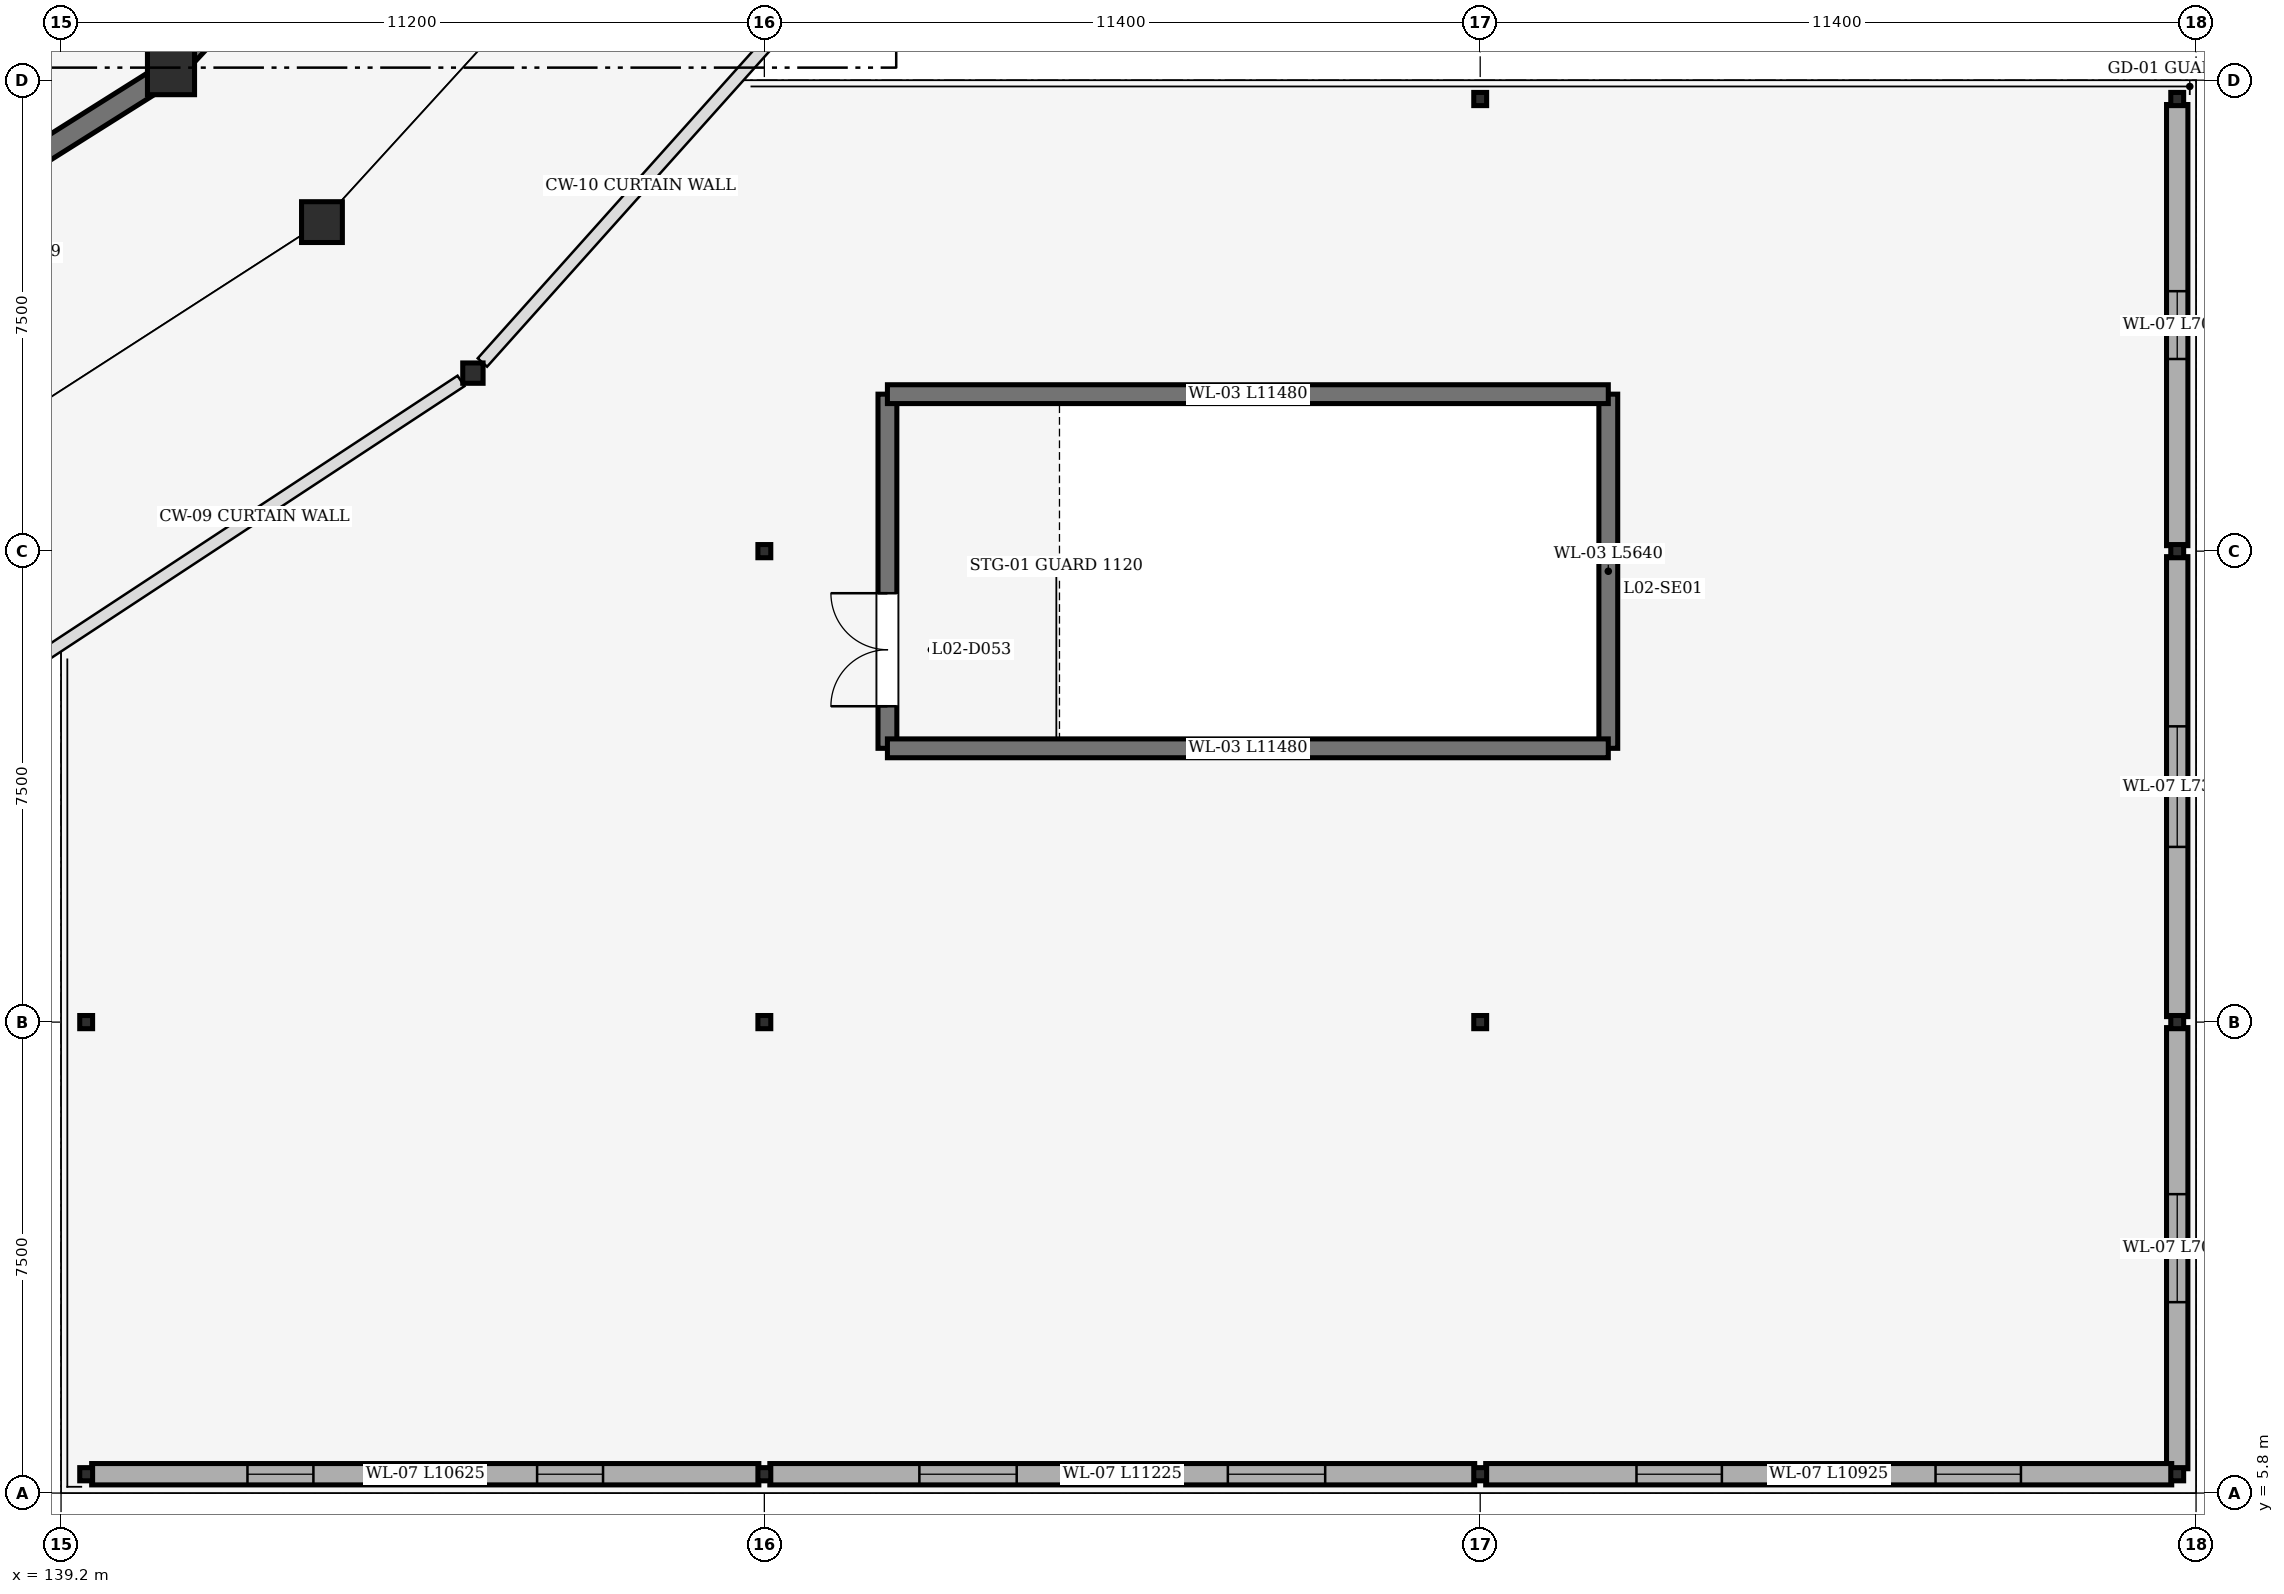
"""IFC4 building model, lengths in metres.
Left out: names, types, materials, properties, quantities, classifications, styles, units other than length and angle.
Written with IfcOpenShell. Run it as: python <this file> out.ifc"""

import sys

from ifc_helpers import new_model, si_unit, direction, frame, frame_2d, origin, origin_2d, place, context, subcontext, project, spatial, rectangle, circle, hollow_circle, i_section, extrude, element, fill, save


model = new_model("IFC4")
c1 = context("Model", 3, precision=1e-05, world=origin(), true_north=direction((0.0, 1.0)))
c2 = subcontext(c1, "Body", "Model", "MODEL_VIEW")
j1 = project(units=[si_unit("LENGTHUNIT", "METRE"), si_unit("PLANEANGLEUNIT", "RADIAN")], contexts=[c1])
p1 = place(None, origin())
s1 = spatial("IfcSite", under=j1, at=p1, CompositionType="ELEMENT")
p2 = place(p1, origin())
s2 = spatial("IfcBuilding", under=s1, at=p2, CompositionType="ELEMENT")
p3 = place(p2, frame((0.0, 0.0, 5.4)))
s3 = spatial("IfcBuildingStorey", under=s2, at=p3, CompositionType="ELEMENT", Elevation=5.4)
p4 = place(p3, frame((140.951, 28.444, 0.0), z_axis=(0.0, 0.0, 1.0), x_axis=(1.0, 0.0, 0.0)))
e1 = element("IfcColumn", 1, at=p4, inside=s3, PredefinedType="COLUMN", context=c2, shape_type="SweptSolid", body=[
    extrude(circle(Radius=0.375, at=origin_2d()), origin(), (0.0, 0.0, 1.0), 4.8),
])
p5 = place(p3, frame((143.355, 26.04, 0.0), z_axis=(0.0, 0.0, 1.0), x_axis=(1.0, 0.0, 0.0)))
e2 = element("IfcColumn", 2, at=p5, inside=s3, PredefinedType="COLUMN", context=c2, shape_type="SweptSolid", body=[
    extrude(circle(Radius=0.325, at=origin_2d()), origin(), (0.0, 0.0, 1.0), 4.8),
])
p6 = place(p3, frame((145.759, 23.635, 0.0), z_axis=(0.0, 0.0, 1.0), x_axis=(1.0, 0.0, 0.0)))
e3 = element("IfcColumn", 3, at=p6, inside=s3, PredefinedType="COLUMN", context=c2, shape_type="SweptSolid", body=[
    extrude(hollow_circle(Radius=0.162, WallThickness=0.013, at=origin_2d()), origin(), (0.0, 0.0, 1.0), 4.8),
])
for number, where, z_axis, x_axis in (
    (4, (139.6, 6.1, 0.0), (0.0, 0.0, 1.0), (1.0, 0.0, 0.0)),
    (5, (139.6, 13.3, 0.0), (0.0, 0.0, 1.0), (1.0, 0.0, 0.0)),
    (6, (150.4, 6.1, 0.0), (0.0, 0.0, 1.0), (1.0, 0.0, 0.0)),
    (7, (150.4, 13.3, 0.0), (0.0, 0.0, 1.0), (1.0, 0.0, 0.0)),
    (8, (150.4, 20.8, 0.0), (0.0, 0.0, 1.0), (1.0, 0.0, 0.0)),
    (9, (161.8, 6.1, 0.0), (0.0, 0.0, 1.0), (1.0, 0.0, 0.0)),
    (10, (161.8, 13.3, 0.0), (0.0, 0.0, 1.0), (1.0, 0.0, 0.0)),
    (11, (161.8, 28.0, 0.0), (0.0, 0.0, 1.0), (1.0, 0.0, 0.0)),
    (12, (172.9, 6.1, 0.0), (0.0, 0.0, 1.0), (1.0, 0.0, 0.0)),
    (13, (172.9, 13.3, 0.0), (0.0, 0.0, 1.0), (1.0, 0.0, 0.0)),
    (14, (172.9, 20.8, 0.0), (0.0, 0.0, 1.0), (1.0, 0.0, 0.0)),
    (15, (172.9, 28.0, 0.0), (0.0, 0.0, 1.0), (1.0, 0.0, 0.0)),
):
    element("IfcColumn", number, at=place(p3, frame(where, z_axis=z_axis, x_axis=x_axis)), inside=s3, PredefinedType="COLUMN", context=c2, shape_type="SweptSolid", body=[
        extrude(i_section(OverallWidth=0.205, OverallDepth=0.21, WebThickness=0.009, FlangeThickness=0.014, at=origin_2d()), origin(), (0.0, 0.0, 1.0), 4.8),
    ])
p7 = place(p3, frame((135.662, 25.113, 0.0), z_axis=(0.0, 0.0, 1.0), x_axis=(0.846113390603, 0.53300293643, 0.0)))
e16 = element("IfcWall", 16, at=p7, inside=s3, PredefinedType="SHEAR", context=c2, shape_type="SweptSolid", body=[
    extrude(rectangle(XDim=5.94, YDim=0.35, at=frame_2d((2.97, 0.0))), origin(), (0.0, 0.0, 1.0), 4.52),
])
p8 = place(p7, frame((2.41, 0.0, 0.0)))
e17 = element("IfcOpeningElement", 17, at=p8, cuts=e16, PredefinedType="OPENING", context=c2, shape_type="SweptSolid", body=[
    extrude(rectangle(XDim=1.12, YDim=2.26, at=frame_2d((0.56, 1.13))), frame((0.0, 0.187, 0.0), z_axis=(0.0, -1.0, 0.0), x_axis=(1.0, 0.0, 0.0)), (0.0, 0.0, 1.0), 0.374),
])
p9 = place(p3, frame((141.162, 28.67, 0.0), z_axis=(0.0, 0.0, 1.0), x_axis=(0.682886399388, 0.730524582427, 0.0)))
e18 = element("IfcWall", 18, at=p9, inside=s3, PredefinedType="SHEAR", context=c2, shape_type="SweptSolid", body=[
    extrude(rectangle(XDim=5.617, YDim=0.35, at=frame_2d((2.809, 0.0))), origin(), (0.0, 0.0, 1.0), 4.52),
])
p10 = place(p9, frame((2.248, 0.0, 0.0)))
e19 = element("IfcOpeningElement", 19, at=p10, cuts=e18, PredefinedType="OPENING", context=c2, shape_type="SweptSolid", body=[
    extrude(rectangle(XDim=1.12, YDim=2.26, at=frame_2d((0.56, 1.13))), frame((0.0, 0.187, 0.0), z_axis=(0.0, -1.0, 0.0), x_axis=(1.0, 0.0, 0.0)), (0.0, 0.0, 1.0), 0.374),
])
p11 = place(p3, frame((172.9, 13.212, 0.0), z_axis=(0.0, 0.0, 1.0), x_axis=(0.0, -1.0, 0.0)))
e20 = element("IfcWall", 20, at=p11, inside=s3, PredefinedType="STANDARD", context=c2, shape_type="SweptSolid", body=[
    extrude(rectangle(XDim=7.025, YDim=0.34, at=frame_2d((3.512, 0.0))), origin(), (0.0, 0.0, 1.0), 3.835),
])
p12 = place(p11, frame((2.653, 0.0, 0.85)))
e21 = element("IfcOpeningElement", 21, at=p12, cuts=e20, PredefinedType="OPENING", context=c2, shape_type="SweptSolid", body=[
    extrude(rectangle(XDim=1.72, YDim=1.75, at=frame_2d((0.86, 0.875))), frame((0.0, 0.182, 0.0), z_axis=(0.0, -1.0, 0.0), x_axis=(1.0, 0.0, 0.0)), (0.0, 0.0, 1.0), 0.364),
])
p13 = place(p3, frame((172.9, 20.712, 0.0), z_axis=(0.0, 0.0, 1.0), x_axis=(0.0, -1.0, 0.0)))
e22 = element("IfcWall", 22, at=p13, inside=s3, PredefinedType="STANDARD", context=c2, shape_type="SweptSolid", body=[
    extrude(rectangle(XDim=7.325, YDim=0.34, at=frame_2d((3.663, 0.0))), origin(), (0.0, 0.0, 1.0), 3.835),
])
p14 = place(p13, frame((2.702, 0.0, 0.85)))
e23 = element("IfcOpeningElement", 23, at=p14, cuts=e22, PredefinedType="OPENING", context=c2, shape_type="SweptSolid", body=[
    extrude(rectangle(XDim=1.92, YDim=1.75, at=frame_2d((0.96, 0.875))), frame((0.0, 0.182, 0.0), z_axis=(0.0, -1.0, 0.0), x_axis=(1.0, 0.0, 0.0)), (0.0, 0.0, 1.0), 0.364),
])
p15 = place(p3, frame((172.9, 27.913, 0.0), z_axis=(0.0, 0.0, 1.0), x_axis=(0.0, -1.0, 0.0)))
e24 = element("IfcWall", 24, at=p15, inside=s3, PredefinedType="STANDARD", context=c2, shape_type="SweptSolid", body=[
    extrude(rectangle(XDim=7.025, YDim=0.34, at=frame_2d((3.513, 0.0))), origin(), (0.0, 0.0, 1.0), 3.909),
])
p16 = place(p15, frame((2.972, 0.0, 0.85)))
e25 = element("IfcOpeningElement", 25, at=p16, cuts=e24, PredefinedType="OPENING", context=c2, shape_type="SweptSolid", body=[
    extrude(rectangle(XDim=1.08, YDim=1.5, at=frame_2d((0.54, 0.75))), frame((0.0, 0.182, 0.0), z_axis=(0.0, -1.0, 0.0), x_axis=(1.0, 0.0, 0.0)), (0.0, 0.0, 1.0), 0.364),
])
p17 = place(p3, frame((172.812, 6.1, 0.0), z_axis=(0.0, 0.0, 1.0), x_axis=(-1.0, 0.0, 0.0)))
e26 = element("IfcWall", 26, at=p17, inside=s3, PredefinedType="STANDARD", context=c2, shape_type="SweptSolid", body=[
    extrude(rectangle(XDim=10.925, YDim=0.34, at=frame_2d((5.462, 0.0))), origin(), (0.0, 0.0, 1.0), 3.737),
])
p18 = place(p17, frame((2.401, 0.0, 0.85)))
e27 = element("IfcOpeningElement", 27, at=p18, cuts=e26, PredefinedType="OPENING", context=c2, shape_type="SweptSolid", body=[
    extrude(rectangle(XDim=1.36, YDim=1.5, at=frame_2d((0.68, 0.75))), frame((0.0, 0.182, 0.0), z_axis=(0.0, -1.0, 0.0), x_axis=(1.0, 0.0, 0.0)), (0.0, 0.0, 1.0), 0.364),
])
p19 = place(p17, frame((7.164, 0.0, 0.85)))
e28 = element("IfcOpeningElement", 28, at=p19, cuts=e26, PredefinedType="OPENING", context=c2, shape_type="SweptSolid", body=[
    extrude(rectangle(XDim=1.36, YDim=1.5, at=frame_2d((0.68, 0.75))), frame((0.0, 0.182, 0.0), z_axis=(0.0, -1.0, 0.0), x_axis=(1.0, 0.0, 0.0)), (0.0, 0.0, 1.0), 0.364),
])
p20 = place(p3, frame((161.712, 6.1, 0.0), z_axis=(0.0, 0.0, 1.0), x_axis=(-1.0, 0.0, 0.0)))
e29 = element("IfcWall", 29, at=p20, inside=s3, PredefinedType="STANDARD", context=c2, shape_type="SweptSolid", body=[
    extrude(rectangle(XDim=11.225, YDim=0.34, at=frame_2d((5.612, 0.0))), origin(), (0.0, 0.0, 1.0), 3.737),
])
p21 = place(p20, frame((2.381, 0.0, 0.85)))
e30 = element("IfcOpeningElement", 30, at=p21, cuts=e29, PredefinedType="OPENING", context=c2, shape_type="SweptSolid", body=[
    extrude(rectangle(XDim=1.55, YDim=1.5, at=frame_2d((0.775, 0.75))), frame((0.0, 0.182, 0.0), z_axis=(0.0, -1.0, 0.0), x_axis=(1.0, 0.0, 0.0)), (0.0, 0.0, 1.0), 0.364),
])
p22 = place(p20, frame((7.294, 0.0, 0.85)))
e31 = element("IfcOpeningElement", 31, at=p22, cuts=e29, PredefinedType="OPENING", context=c2, shape_type="SweptSolid", body=[
    extrude(rectangle(XDim=1.55, YDim=1.5, at=frame_2d((0.775, 0.75))), frame((0.0, 0.182, 0.0), z_axis=(0.0, -1.0, 0.0), x_axis=(1.0, 0.0, 0.0)), (0.0, 0.0, 1.0), 0.364),
])
p23 = place(p3, frame((150.312, 6.1, 0.0), z_axis=(0.0, 0.0, 1.0), x_axis=(-1.0, 0.0, 0.0)))
e32 = element("IfcWall", 32, at=p23, inside=s3, PredefinedType="STANDARD", context=c2, shape_type="SweptSolid", body=[
    extrude(rectangle(XDim=10.625, YDim=0.34, at=frame_2d((5.312, 0.0))), origin(), (0.0, 0.0, 1.0), 3.737),
])
p24 = place(p23, frame((2.481, 0.0, 0.85)))
e33 = element("IfcOpeningElement", 33, at=p24, cuts=e32, PredefinedType="OPENING", context=c2, shape_type="SweptSolid", body=[
    extrude(rectangle(XDim=1.05, YDim=2.2, at=frame_2d((0.525, 1.1))), frame((0.0, 0.182, 0.0), z_axis=(0.0, -1.0, 0.0), x_axis=(1.0, 0.0, 0.0)), (0.0, 0.0, 1.0), 0.364),
])
p25 = place(p23, frame((7.094, 0.0, 0.85)))
e34 = element("IfcOpeningElement", 34, at=p25, cuts=e32, PredefinedType="OPENING", context=c2, shape_type="SweptSolid", body=[
    extrude(rectangle(XDim=1.05, YDim=2.2, at=frame_2d((0.525, 1.1))), frame((0.0, 0.182, 0.0), z_axis=(0.0, -1.0, 0.0), x_axis=(1.0, 0.0, 0.0)), (0.0, 0.0, 1.0), 0.364),
])
p26 = place(p3, frame((152.36, 17.66, 0.0), z_axis=(0.0, 0.0, 1.0), x_axis=(0.0, 1.0, 0.0)))
e35 = element("IfcWall", 35, at=p26, inside=s3, PredefinedType="SHEAR", context=c2, shape_type="SweptSolid", body=[
    extrude(rectangle(XDim=5.64, YDim=0.3, at=frame_2d((2.82, 0.0))), origin(), (0.0, 0.0, 1.0), 4.45),
])
p27 = place(p26, frame((0.67, 0.0, 0.0)))
e36 = element("IfcOpeningElement", 36, at=p27, cuts=e35, PredefinedType="OPENING", context=c2, shape_type="SweptSolid", body=[
    extrude(rectangle(XDim=1.8, YDim=2.2, at=frame_2d((0.9, 1.1))), frame((0.0, 0.162, 0.0), z_axis=(0.0, -1.0, 0.0), x_axis=(1.0, 0.0, 0.0)), (0.0, 0.0, 1.0), 0.324),
])
p28 = place(p3, frame((163.84, 23.3, 0.0), z_axis=(0.0, 0.0, 1.0), x_axis=(0.0, -1.0, 0.0)))
e37 = element("IfcWall", 37, at=p28, inside=s3, PredefinedType="SHEAR", context=c2, shape_type="SweptSolid", body=[
    extrude(rectangle(XDim=5.64, YDim=0.3, at=frame_2d((2.82, 0.0))), origin(), (0.0, 0.0, 1.0), 4.45),
])
for number, where, z_axis, x_axis in (
    (38, (163.84, 17.66, 0.0), (0.0, 0.0, 1.0), (-1.0, 0.0, 0.0)),
    (39, (152.36, 23.3, 0.0), (0.0, 0.0, 1.0), (1.0, 0.0, 0.0)),
):
    element("IfcWall", number, at=place(p3, frame(where, z_axis=z_axis, x_axis=x_axis)), inside=s3, PredefinedType="SHEAR", context=c2, shape_type="SweptSolid", body=[
        extrude(rectangle(XDim=11.48, YDim=0.3, at=frame_2d((5.74, 0.0))), origin(), (0.0, 0.0, 1.0), 4.45),
    ])
p29 = place(p12, origin())
e40 = element("IfcWindow", 40, at=p29, inside=s3, PartitioningType="DOUBLE_PANEL_VERTICAL", PredefinedType="WINDOW", context=c2, shape_type="SweptSolid", body=[
    extrude(rectangle(XDim=1.72, YDim=1.75, at=frame_2d((0.86, 0.875))), frame((0.0, 0.03, 0.0), z_axis=(0.0, -1.0, 0.0), x_axis=(1.0, 0.0, 0.0)), (0.0, 0.0, 1.0), 0.06),
])
fill(e21, e40)
p30 = place(p14, origin())
e41 = element("IfcWindow", 41, at=p30, inside=s3, PartitioningType="DOUBLE_PANEL_VERTICAL", PredefinedType="WINDOW", context=c2, shape_type="SweptSolid", body=[
    extrude(rectangle(XDim=1.92, YDim=1.75, at=frame_2d((0.96, 0.875))), frame((0.0, 0.03, 0.0), z_axis=(0.0, -1.0, 0.0), x_axis=(1.0, 0.0, 0.0)), (0.0, 0.0, 1.0), 0.06),
])
fill(e23, e41)
p31 = place(p16, origin())
e42 = element("IfcWindow", 42, at=p31, inside=s3, PartitioningType="DOUBLE_PANEL_VERTICAL", PredefinedType="WINDOW", context=c2, shape_type="SweptSolid", body=[
    extrude(rectangle(XDim=1.08, YDim=1.5, at=frame_2d((0.54, 0.75))), frame((0.0, 0.03, 0.0), z_axis=(0.0, -1.0, 0.0), x_axis=(1.0, 0.0, 0.0)), (0.0, 0.0, 1.0), 0.06),
])
fill(e25, e42)
p32 = place(p18, origin())
e43 = element("IfcWindow", 43, at=p32, inside=s3, PartitioningType="DOUBLE_PANEL_VERTICAL", PredefinedType="WINDOW", context=c2, shape_type="SweptSolid", body=[
    extrude(rectangle(XDim=1.36, YDim=1.5, at=frame_2d((0.68, 0.75))), frame((0.0, 0.03, 0.0), z_axis=(0.0, -1.0, 0.0), x_axis=(1.0, 0.0, 0.0)), (0.0, 0.0, 1.0), 0.06),
])
fill(e27, e43)
p33 = place(p19, origin())
e44 = element("IfcWindow", 44, at=p33, inside=s3, PartitioningType="DOUBLE_PANEL_VERTICAL", PredefinedType="WINDOW", context=c2, shape_type="SweptSolid", body=[
    extrude(rectangle(XDim=1.36, YDim=1.5, at=frame_2d((0.68, 0.75))), frame((0.0, 0.03, 0.0), z_axis=(0.0, -1.0, 0.0), x_axis=(1.0, 0.0, 0.0)), (0.0, 0.0, 1.0), 0.06),
])
fill(e28, e44)
p34 = place(p21, origin())
e45 = element("IfcWindow", 45, at=p34, inside=s3, PartitioningType="DOUBLE_PANEL_VERTICAL", PredefinedType="WINDOW", context=c2, shape_type="SweptSolid", body=[
    extrude(rectangle(XDim=1.55, YDim=1.5, at=frame_2d((0.775, 0.75))), frame((0.0, 0.03, 0.0), z_axis=(0.0, -1.0, 0.0), x_axis=(1.0, 0.0, 0.0)), (0.0, 0.0, 1.0), 0.06),
])
fill(e30, e45)
p35 = place(p22, origin())
e46 = element("IfcWindow", 46, at=p35, inside=s3, PartitioningType="DOUBLE_PANEL_VERTICAL", PredefinedType="WINDOW", context=c2, shape_type="SweptSolid", body=[
    extrude(rectangle(XDim=1.55, YDim=1.5, at=frame_2d((0.775, 0.75))), frame((0.0, 0.03, 0.0), z_axis=(0.0, -1.0, 0.0), x_axis=(1.0, 0.0, 0.0)), (0.0, 0.0, 1.0), 0.06),
])
fill(e31, e46)
p36 = place(p24, origin())
e47 = element("IfcWindow", 47, at=p36, inside=s3, PartitioningType="DOUBLE_PANEL_VERTICAL", PredefinedType="WINDOW", context=c2, shape_type="SweptSolid", body=[
    extrude(rectangle(XDim=1.05, YDim=2.2, at=frame_2d((0.525, 1.1))), frame((0.0, 0.03, 0.0), z_axis=(0.0, -1.0, 0.0), x_axis=(1.0, 0.0, 0.0)), (0.0, 0.0, 1.0), 0.06),
])
fill(e33, e47)
p37 = place(p25, origin())
e48 = element("IfcWindow", 48, at=p37, inside=s3, PartitioningType="DOUBLE_PANEL_VERTICAL", PredefinedType="WINDOW", context=c2, shape_type="SweptSolid", body=[
    extrude(rectangle(XDim=1.05, YDim=2.2, at=frame_2d((0.525, 1.1))), frame((0.0, 0.03, 0.0), z_axis=(0.0, -1.0, 0.0), x_axis=(1.0, 0.0, 0.0)), (0.0, 0.0, 1.0), 0.06),
])
fill(e34, e48)
p38 = place(p27, origin())
e49 = element("IfcDoor", 49, at=p38, inside=s3, OperationType="DOUBLE_DOOR_SINGLE_SWING", PredefinedType="DOOR", context=c2, shape_type="SweptSolid", body=[
    extrude(rectangle(XDim=1.8, YDim=2.2, at=frame_2d((0.9, 1.1))), frame((0.0, 0.025, 0.0), z_axis=(0.0, -1.0, 0.0), x_axis=(1.0, 0.0, 0.0)), (0.0, 0.0, 1.0), 0.05),
])
fill(e36, e49)
save(model, sys.argv[1])
